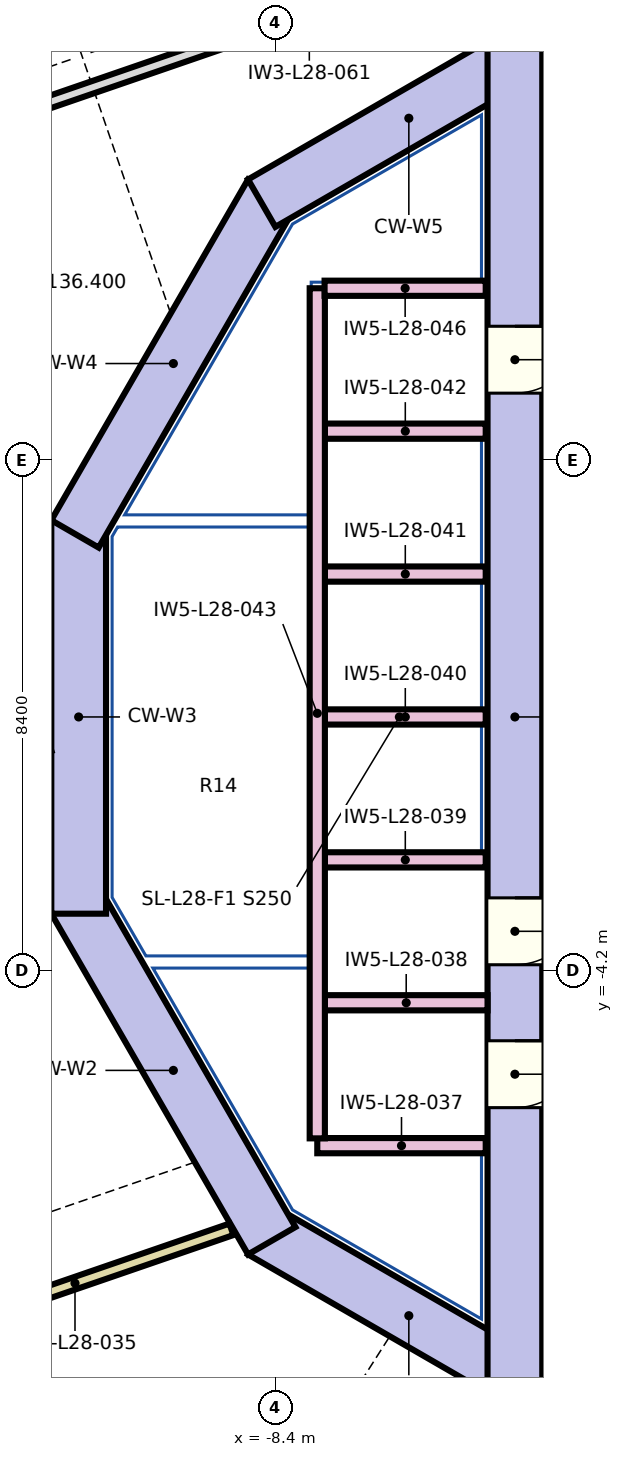
"""IFC4 building model, lengths in metres.
Left out: names, types, materials, properties, quantities, classifications, styles, units other than length and angle.
Written with IfcOpenShell. Run it as: python <this file> out.ifc"""

import sys

from ifc_helpers import new_model, si_unit, direction, frame, frame_2d, origin, place, context, subcontext, project, spatial, rectangle, extrude, element, fill, save


model = new_model("IFC4")
c1 = context("Model", 3, precision=1e-05, world=origin(), true_north=direction((0.0, 1.0)))
c2 = subcontext(c1, "Body", "Model", "MODEL_VIEW")
j1 = project(units=[si_unit("LENGTHUNIT", "METRE"), si_unit("PLANEANGLEUNIT", "RADIAN")], contexts=[c1])
p1 = place(None, origin())
s1 = spatial("IfcSite", under=j1, at=p1, CompositionType="ELEMENT")
p2 = place(p1, origin())
s2 = spatial("IfcBuilding", under=s1, at=p2, CompositionType="ELEMENT")
p3 = place(p2, frame((0.0, 0.0, 134.5)))
s3 = spatial("IfcBuildingStorey", under=s2, at=p3, CompositionType="ELEMENT", Elevation=134.5)
p4 = place(p3, frame((-3.775, -11.243, 0.0), z_axis=(0.0, 0.0, 1.0), x_axis=(-0.866026961591, 0.49999730179, 0.0)))
e1 = element("IfcWall", 1, at=p4, inside=s3, PredefinedType="SHEAR", context=c2, shape_type="SweptSolid", body=[
    extrude(rectangle(XDim=5.587, YDim=0.9, at=frame_2d((2.794, 0.0))), origin(), (0.0, 0.0, 1.0), 3.8),
])
p5 = place(p3, frame((-8.449, -8.614, 0.0), z_axis=(0.0, 0.0, 1.0), x_axis=(-0.499990282633, 0.866031014036, 0.0)))
e2 = element("IfcWall", 2, at=p5, inside=s3, PredefinedType="SHEAR", context=c2, shape_type="SweptSolid", body=[
    extrude(rectangle(XDim=6.47, YDim=0.9, at=frame_2d((3.235, 0.0))), origin(), (0.0, 0.0, 1.0), 3.8),
])
p6 = place(p3, frame((-11.624, -3.235, 0.0), z_axis=(0.0, 0.0, 1.0), x_axis=(0.0, 1.0, 0.0)))
e3 = element("IfcWall", 3, at=p6, inside=s3, PredefinedType="SHEAR", context=c2, shape_type="SweptSolid", body=[
    extrude(rectangle(XDim=6.471, YDim=0.9, at=frame_2d((3.235, 0.0))), origin(), (0.0, 0.0, 1.0), 3.8),
])
p7 = place(p3, frame((-11.684, 3.01, 0.0), z_axis=(0.0, 0.0, 1.0), x_axis=(0.499990282633, 0.866031014036, 0.0)))
e4 = element("IfcWall", 4, at=p7, inside=s3, PredefinedType="SHEAR", context=c2, shape_type="SweptSolid", body=[
    extrude(rectangle(XDim=6.47, YDim=0.9, at=frame_2d((3.235, 0.0))), origin(), (0.0, 0.0, 1.0), 3.8),
])
p8 = place(p3, frame((-8.614, 8.449, 0.0), z_axis=(0.0, 0.0, 1.0), x_axis=(0.866026961591, 0.49999730179, 0.0)))
e5 = element("IfcWall", 5, at=p8, inside=s3, PredefinedType="SHEAR", context=c2, shape_type="SweptSolid", body=[
    extrude(rectangle(XDim=5.587, YDim=0.9, at=frame_2d((2.794, 0.0))), origin(), (0.0, 0.0, 1.0), 3.8),
])
p9 = place(p3, frame((-4.45, 11.633, 0.0), z_axis=(0.0, 0.0, 1.0), x_axis=(0.0, -1.0, 0.0)))
e6 = element("IfcWall", 6, at=p9, inside=s3, PredefinedType="SHEAR", context=c2, shape_type="SweptSolid", body=[
    extrude(rectangle(XDim=23.265, YDim=0.9, at=frame_2d((11.633, 0.0))), origin(), (0.0, 0.0, 1.0), 3.8),
])
p10 = place(p9, frame((14.607, 0.0, 0.0)))
e7 = element("IfcOpeningElement", 7, at=p10, cuts=e6, PredefinedType="OPENING", context=c2, shape_type="SweptSolid", body=[
    extrude(rectangle(XDim=1.1, YDim=2.1, at=frame_2d((0.55, 1.05))), frame((0.0, 0.46, 0.0), z_axis=(0.0, -1.0, 0.0), x_axis=(1.0, 0.0, 0.0)), (0.0, 0.0, 1.0), 0.92),
])
p11 = place(p9, frame((16.958, 0.0, 0.0)))
e8 = element("IfcOpeningElement", 8, at=p11, cuts=e6, PredefinedType="OPENING", context=c2, shape_type="SweptSolid", body=[
    extrude(rectangle(XDim=1.1, YDim=2.1, at=frame_2d((0.55, 1.05))), frame((0.0, 0.46, 0.0), z_axis=(0.0, -1.0, 0.0), x_axis=(1.0, 0.0, 0.0)), (0.0, 0.0, 1.0), 0.92),
])
p12 = place(p9, frame((5.208, 0.0, 0.0)))
e9 = element("IfcOpeningElement", 9, at=p12, cuts=e6, PredefinedType="OPENING", context=c2, shape_type="SweptSolid", body=[
    extrude(rectangle(XDim=1.1, YDim=2.1, at=frame_2d((0.55, 1.05))), frame((0.0, 0.46, 0.0), z_axis=(0.0, -1.0, 0.0), x_axis=(1.0, 0.0, 0.0)), (0.0, 0.0, 1.0), 0.92),
])
p13 = place(p3, frame((-17.892, 0.051, 0.0), z_axis=(0.0, 0.0, 1.0), x_axis=(0.325580537834, -0.94551431157, 0.0)))
e10 = element("IfcWall", 10, at=p13, inside=s3, PredefinedType="PARTITIONING", context=c2, shape_type="SweptSolid", body=[
    extrude(rectangle(XDim=19.374, YDim=0.2, at=frame_2d((9.687, 0.0))), origin(), (0.0, 0.0, 1.0), 3.55),
])
p14 = place(p13, frame((9.786, 0.0, 0.0)))
e11 = element("IfcOpeningElement", 11, at=p14, cuts=e10, PredefinedType="OPENING", context=c2, shape_type="SweptSolid", body=[
    extrude(rectangle(XDim=0.9, YDim=2.1, at=frame_2d((0.45, 1.05))), frame((0.0, 0.11, 0.0), z_axis=(0.0, -1.0, 0.0), x_axis=(1.0, 0.0, 0.0)), (0.0, 0.0, 1.0), 0.22),
])
p15 = place(p3, frame((-12.586, -20.515, 0.0), z_axis=(0.0, 0.0, 1.0), x_axis=(0.945519939336, 0.325564193852, 0.0)))
e12 = element("IfcWall", 12, at=p15, inside=s3, PredefinedType="PARTITIONING", context=c2, shape_type="SweptSolid", body=[
    extrude(rectangle(XDim=37.28, YDim=0.2, at=frame_2d((18.64, 0.0))), origin(), (0.0, 0.0, 1.0), 3.55),
])
p16 = place(p15, frame((9.83, 0.0, 0.0)))
e13 = element("IfcOpeningElement", 13, at=p16, cuts=e12, PredefinedType="OPENING", context=c2, shape_type="SweptSolid", body=[
    extrude(rectangle(XDim=1.0, YDim=2.1, at=frame_2d((0.5, 1.05))), frame((0.0, 0.11, 0.0), z_axis=(0.0, -1.0, 0.0), x_axis=(1.0, 0.0, 0.0)), (0.0, 0.0, 1.0), 0.22),
])
p17 = place(p15, frame((18.93, 0.0, 0.0)))
e14 = element("IfcOpeningElement", 14, at=p17, cuts=e12, PredefinedType="OPENING", context=c2, shape_type="SweptSolid", body=[
    extrude(rectangle(XDim=1.0, YDim=2.1, at=frame_2d((0.5, 1.05))), frame((0.0, 0.11, 0.0), z_axis=(0.0, -1.0, 0.0), x_axis=(1.0, 0.0, 0.0)), (0.0, 0.0, 1.0), 0.22),
])
p18 = place(p15, frame((30.28, 0.0, 0.0)))
e15 = element("IfcOpeningElement", 15, at=p18, cuts=e12, PredefinedType="OPENING", context=c2, shape_type="SweptSolid", body=[
    extrude(rectangle(XDim=1.0, YDim=2.1, at=frame_2d((0.5, 1.05))), frame((0.0, 0.11, 0.0), z_axis=(0.0, -1.0, 0.0), x_axis=(1.0, 0.0, 0.0)), (0.0, 0.0, 1.0), 0.22),
])
p19 = place(p15, frame((0.13, 0.0, 0.0)))
e16 = element("IfcOpeningElement", 16, at=p19, cuts=e12, PredefinedType="OPENING", context=c2, shape_type="SweptSolid", body=[
    extrude(rectangle(XDim=1.0, YDim=2.1, at=frame_2d((0.5, 1.05))), frame((0.0, 0.11, 0.0), z_axis=(0.0, -1.0, 0.0), x_axis=(1.0, 0.0, 0.0)), (0.0, 0.0, 1.0), 0.22),
])
p20 = place(p15, frame((34.23, 0.0, 0.0)))
e17 = element("IfcOpeningElement", 17, at=p20, cuts=e12, PredefinedType="OPENING", context=c2, shape_type="SweptSolid", body=[
    extrude(rectangle(XDim=1.1, YDim=2.1, at=frame_2d((0.55, 1.05))), frame((0.0, 0.11, 0.0), z_axis=(0.0, -1.0, 0.0), x_axis=(1.0, 0.0, 0.0)), (0.0, 0.0, 1.0), 0.22),
])
p21 = place(p3, frame((-12.104, -0.466, 0.0), z_axis=(0.0, 0.0, 1.0), x_axis=(-0.945514533015, -0.325579894737, 0.0)))
e18 = element("IfcWall", 18, at=p21, inside=s3, PredefinedType="PARTITIONING", context=c2, shape_type="SweptSolid", body=[
    extrude(rectangle(XDim=5.184, YDim=0.2, at=frame_2d((2.592, 0.0))), origin(), (0.0, 0.0, 1.0), 3.55),
])
p22 = place(p3, frame((-9.112, -8.426, 0.0), z_axis=(0.0, 0.0, 1.0), x_axis=(-0.945518793757, -0.32556752088, 0.0)))
e19 = element("IfcWall", 19, at=p22, inside=s3, PredefinedType="PARTITIONING", context=c2, shape_type="SweptSolid", body=[
    extrude(rectangle(XDim=5.441, YDim=0.2, at=frame_2d((2.721, 0.0))), origin(), (0.0, 0.0, 1.0), 3.55),
])
p23 = place(p3, frame((-7.7, -7.05, 0.0), z_axis=(0.0, 0.0, 1.0), x_axis=(1.0, 0.0, 0.0)))
e20 = element("IfcWall", 20, at=p23, inside=s3, PredefinedType="SOLIDWALL", context=c2, shape_type="SweptSolid", body=[
    extrude(rectangle(XDim=2.77, YDim=0.25, at=frame_2d((1.385, 0.0))), origin(), (0.0, 0.0, 1.0), 3.55),
])
p24 = place(p3, frame((-7.575, -4.7, 0.0), z_axis=(0.0, 0.0, 1.0), x_axis=(1.0, 0.0, 0.0)))
e21 = element("IfcWall", 21, at=p24, inside=s3, PredefinedType="SOLIDWALL", context=c2, shape_type="SweptSolid", body=[
    extrude(rectangle(XDim=2.675, YDim=0.25, at=frame_2d((1.337, 0.0))), origin(), (0.0, 0.0, 1.0), 3.55),
])
for number, where, z_axis, x_axis in (
    (22, (-7.575, -2.35, 0.0), (0.0, 0.0, 1.0), (1.0, 0.0, 0.0)),
    (23, (-7.575, 0.0, 0.0), (0.0, 0.0, 1.0), (1.0, 0.0, 0.0)),
    (24, (-7.575, 2.35, 0.0), (0.0, 0.0, 1.0), (1.0, 0.0, 0.0)),
    (25, (-7.575, 4.7, 0.0), (0.0, 0.0, 1.0), (1.0, 0.0, 0.0)),
):
    element("IfcWall", number, at=place(p3, frame(where, z_axis=z_axis, x_axis=x_axis)), inside=s3, PredefinedType="SOLIDWALL", context=c2, shape_type="SweptSolid", body=[
        extrude(rectangle(XDim=2.645, YDim=0.25, at=frame_2d((1.323, 0.0))), origin(), (0.0, 0.0, 1.0), 3.55),
    ])
p25 = place(p3, frame((-7.7, 7.05, 0.0), z_axis=(0.0, 0.0, 1.0), x_axis=(0.0, -1.0, 0.0)))
e26 = element("IfcWall", 26, at=p25, inside=s3, PredefinedType="SOLIDWALL", context=c2, shape_type="SweptSolid", body=[
    extrude(rectangle(XDim=13.98, YDim=0.25, at=frame_2d((6.99, 0.0))), origin(), (0.0, 0.0, 1.0), 3.55),
])
p26 = place(p3, frame((-4.93, 7.05, 0.0), z_axis=(0.0, 0.0, 1.0), x_axis=(-1.0, 0.0, 0.0)))
e27 = element("IfcWall", 27, at=p26, inside=s3, PredefinedType="SOLIDWALL", context=c2, shape_type="SweptSolid", body=[
    extrude(rectangle(XDim=2.65, YDim=0.25, at=frame_2d((1.325, 0.0))), origin(), (0.0, 0.0, 1.0), 3.55),
])
p27 = place(p3, frame((4.599, 15.862, 0.0), z_axis=(0.0, 0.0, 1.0), x_axis=(-0.94551912499, -0.325566558907, 0.0)))
e28 = element("IfcWall", 28, at=p27, inside=s3, PredefinedType="PARTITIONING", context=c2, shape_type="SweptSolid", body=[
    extrude(rectangle(XDim=26.293, YDim=0.2, at=frame_2d((13.146, 0.0))), origin(), (0.0, 0.0, 1.0), 3.55),
])
p28 = place(p27, frame((10.81, 0.0, 0.0)))
e29 = element("IfcOpeningElement", 29, at=p28, cuts=e28, PredefinedType="OPENING", context=c2, shape_type="SweptSolid", body=[
    extrude(rectangle(XDim=0.9, YDim=2.1, at=frame_2d((0.45, 1.05))), frame((0.0, 0.11, 0.0), z_axis=(0.0, -1.0, 0.0), x_axis=(1.0, 0.0, 0.0)), (0.0, 0.0, 1.0), 0.22),
])
p29 = place(p27, frame((3.865, 0.0, 0.0)))
e30 = element("IfcOpeningElement", 30, at=p29, cuts=e28, PredefinedType="OPENING", context=c2, shape_type="SweptSolid", body=[
    extrude(rectangle(XDim=2.0, YDim=2.1, at=frame_2d((1.0, 1.05))), frame((0.0, 0.11, 0.0), z_axis=(0.0, -1.0, 0.0), x_axis=(1.0, 0.0, 0.0)), (0.0, 0.0, 1.0), 0.22),
])
p30 = place(p3, frame((-11.86, 12.098, 0.0), z_axis=(0.0, 0.0, 1.0), x_axis=(-0.945521627167, -0.325559291927, 0.0)))
e31 = element("IfcWall", 31, at=p30, inside=s3, PredefinedType="PARTITIONING", context=c2, shape_type="SweptSolid", body=[
    extrude(rectangle(XDim=11.425, YDim=0.2, at=frame_2d((5.712, 0.0))), origin(), (0.0, 0.0, 1.0), 3.55),
])
p31 = place(p30, frame((2.45, 0.0, 0.0)))
e32 = element("IfcOpeningElement", 32, at=p31, cuts=e31, PredefinedType="OPENING", context=c2, shape_type="SweptSolid", body=[
    extrude(rectangle(XDim=0.95, YDim=2.1, at=frame_2d((0.475, 1.05))), frame((0.0, 0.11, 0.0), z_axis=(0.0, -1.0, 0.0), x_axis=(1.0, 0.0, 0.0)), (0.0, 0.0, 1.0), 0.22),
])
p32 = place(p30, frame((8.375, 0.0, 0.0)))
e33 = element("IfcOpeningElement", 33, at=p32, cuts=e31, PredefinedType="OPENING", context=c2, shape_type="SweptSolid", body=[
    extrude(rectangle(XDim=1.1, YDim=2.1, at=frame_2d((0.55, 1.05))), frame((0.0, 0.11, 0.0), z_axis=(0.0, -1.0, 0.0), x_axis=(1.0, 0.0, 0.0)), (0.0, 0.0, 1.0), 0.22),
])
p33 = place(p10, origin())
e34 = element("IfcDoor", 34, at=p33, inside=s3, OperationType="SLIDING_TO_LEFT", PredefinedType="DOOR", context=c2, shape_type="SweptSolid", body=[
    extrude(rectangle(XDim=1.1, YDim=2.1, at=frame_2d((0.55, 1.05))), frame((0.0, 0.025, 0.0), z_axis=(0.0, -1.0, 0.0), x_axis=(1.0, 0.0, 0.0)), (0.0, 0.0, 1.0), 0.05),
])
fill(e7, e34)
p34 = place(p11, origin())
e35 = element("IfcDoor", 35, at=p34, inside=s3, OperationType="SLIDING_TO_LEFT", PredefinedType="DOOR", context=c2, shape_type="SweptSolid", body=[
    extrude(rectangle(XDim=1.1, YDim=2.1, at=frame_2d((0.55, 1.05))), frame((0.0, 0.025, 0.0), z_axis=(0.0, -1.0, 0.0), x_axis=(1.0, 0.0, 0.0)), (0.0, 0.0, 1.0), 0.05),
])
fill(e8, e35)
p35 = place(p12, origin())
e36 = element("IfcDoor", 36, at=p35, inside=s3, OperationType="SLIDING_TO_LEFT", PredefinedType="DOOR", context=c2, shape_type="SweptSolid", body=[
    extrude(rectangle(XDim=1.1, YDim=2.1, at=frame_2d((0.55, 1.05))), frame((0.0, 0.025, 0.0), z_axis=(0.0, -1.0, 0.0), x_axis=(1.0, 0.0, 0.0)), (0.0, 0.0, 1.0), 0.05),
])
fill(e9, e36)
save(model, sys.argv[1])
